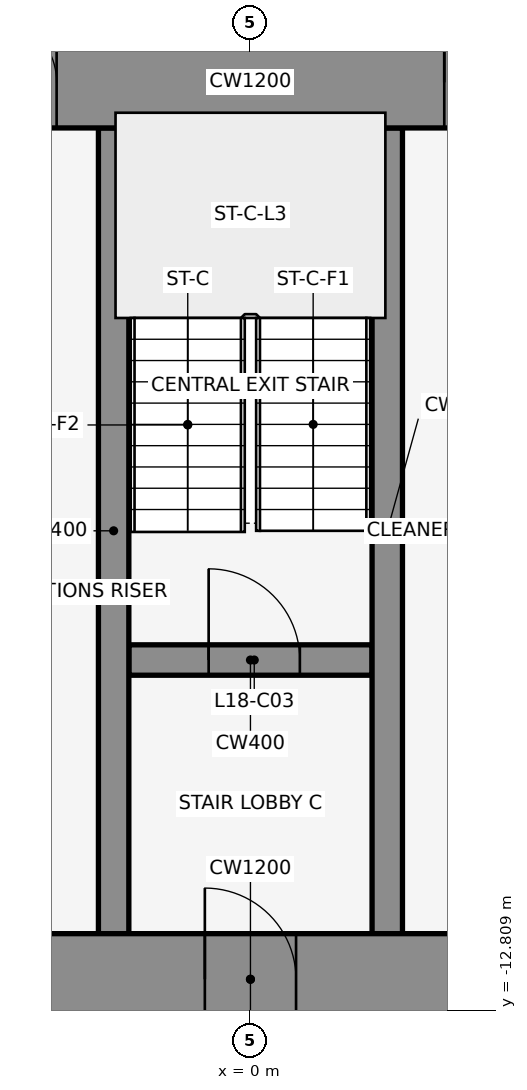
"""IFC4 building model, lengths in metres.
Left out: names, types, materials, properties, quantities, classifications, styles, units other than length and angle.
Written with IfcOpenShell. Run it as: python <this file> out.ifc"""

import sys

from ifc_helpers import new_model, si_unit, direction, frame, frame_2d, origin, place, context, subcontext, project, spatial, rectangle, extrude, element, fill, save


model = new_model("IFC4")
c1 = context("Model", 3, precision=1e-05, world=origin(), true_north=direction((0.0, 1.0)))
c2 = subcontext(c1, "Body", "Model", "MODEL_VIEW")
j1 = project(units=[si_unit("LENGTHUNIT", "METRE"), si_unit("PLANEANGLEUNIT", "RADIAN")], contexts=[c1])
p1 = place(None, origin())
s1 = spatial("IfcSite", under=j1, at=p1, CompositionType="ELEMENT")
p2 = place(p1, origin())
s2 = spatial("IfcBuilding", under=s1, at=p2, CompositionType="ELEMENT")
p3 = place(p2, frame((0.0, 0.0, 89.9)))
s3 = spatial("IfcBuildingStorey", under=s2, at=p3, CompositionType="ELEMENT", Elevation=89.9)
for number, where, z_axis, x_axis in (
    (1, (1.901, 1.08, 0.0), (0.0, 0.0, 1.0), (-0.84, -0.543, 0.0)),
    (2, (-0.068, -0.105, 0.0), (0.0, 0.0, 1.0), (-0.84, 0.543, 0.0)),
):
    element("IfcWall", number, at=place(p3, frame(where, z_axis=z_axis, x_axis=x_axis)), inside=s3, PredefinedType="STANDARD", context=c2, shape_type="SweptSolid", body=[
        extrude(rectangle(XDim=2.183, YDim=0.25, at=frame_2d((1.091, 0.0))), origin(), (0.0, 0.0, 1.0), 3.95),
    ])
p4 = place(p3, frame((-1.6, -8.2, 0.0), z_axis=(0.0, 0.0, 1.0), x_axis=(1.0, 0.0, 0.0)))
e3 = element("IfcWall", 3, at=p4, inside=s3, PredefinedType="SHEAR", context=c2, shape_type="SweptSolid", body=[
    extrude(rectangle(XDim=3.2, YDim=0.4, at=frame_2d((1.6, 0.0))), origin(), (0.0, 0.0, 1.0), 4.1),
])
p5 = place(p4, frame((1.05, 0.0, 0.0)))
e4 = element("IfcOpeningElement", 4, at=p5, cuts=e3, PredefinedType="OPENING", context=c2, shape_type="SweptSolid", body=[
    extrude(rectangle(XDim=1.2, YDim=2.1, at=frame_2d((0.6, 1.05))), frame((0.0, 0.212, 0.0), z_axis=(0.0, -1.0, 0.0), x_axis=(1.0, 0.0, 0.0)), (0.0, 0.0, 1.0), 0.424),
])
for number, where, z_axis, x_axis in (
    (5, (-1.8, -11.8, 0.0), (0.0, 0.0, 1.0), (0.0, 1.0, 0.0)),
    (6, (1.8, -11.8, 0.0), (0.0, 0.0, 1.0), (0.0, 1.0, 0.0)),
):
    element("IfcWall", number, at=place(p3, frame(where, z_axis=z_axis, x_axis=x_axis)), inside=s3, PredefinedType="SHEAR", context=c2, shape_type="SweptSolid", body=[
        extrude(rectangle(XDim=10.6, YDim=0.4, at=frame_2d((5.3, 0.0))), origin(), (0.0, 0.0, 1.0), 4.1),
    ])
p6 = place(p3, frame((-22.0, -0.6, 0.0), z_axis=(0.0, 0.0, 1.0), x_axis=(1.0, 0.0, 0.0)))
e7 = element("IfcWall", 7, at=p6, inside=s3, PredefinedType="SHEAR", context=c2, shape_type="SweptSolid", body=[
    extrude(rectangle(XDim=44.0, YDim=1.2, at=frame_2d((22.0, 0.0))), origin(), (0.0, 0.0, 1.0), 4.1),
])
p7 = place(p6, frame((18.55, 0.0, 0.0)))
e8 = element("IfcOpeningElement", 8, at=p7, cuts=e7, PredefinedType="OPENING", context=c2, shape_type="SweptSolid", body=[
    extrude(rectangle(XDim=0.9, YDim=2.1, at=frame_2d((0.45, 1.05))), frame((0.0, 0.612, 0.0), z_axis=(0.0, -1.0, 0.0), x_axis=(1.0, 0.0, 0.0)), (0.0, 0.0, 1.0), 1.224),
])
p8 = place(p6, frame((24.55, 0.0, 0.0)))
e9 = element("IfcOpeningElement", 9, at=p8, cuts=e7, PredefinedType="OPENING", context=c2, shape_type="SweptSolid", body=[
    extrude(rectangle(XDim=0.9, YDim=2.1, at=frame_2d((0.45, 1.05))), frame((0.0, 0.612, 0.0), z_axis=(0.0, -1.0, 0.0), x_axis=(1.0, 0.0, 0.0)), (0.0, 0.0, 1.0), 1.224),
])
p9 = place(p3, frame((-22.0, -12.4, 0.0), z_axis=(0.0, 0.0, 1.0), x_axis=(1.0, 0.0, 0.0)))
e10 = element("IfcWall", 10, at=p9, inside=s3, PredefinedType="SHEAR", context=c2, shape_type="SweptSolid", body=[
    extrude(rectangle(XDim=44.0, YDim=1.2, at=frame_2d((22.0, 0.0))), origin(), (0.0, 0.0, 1.0), 4.1),
])
p10 = place(p9, frame((2.2, 0.0, 0.0)))
e11 = element("IfcOpeningElement", 11, at=p10, cuts=e10, PredefinedType="OPENING", context=c2, shape_type="SweptSolid", body=[
    extrude(rectangle(XDim=1.2, YDim=2.1, at=frame_2d((0.6, 1.05))), frame((0.0, 0.612, 0.0), z_axis=(0.0, -1.0, 0.0), x_axis=(1.0, 0.0, 0.0)), (0.0, 0.0, 1.0), 1.224),
])
p11 = place(p9, frame((21.4, 0.0, 0.0)))
e12 = element("IfcOpeningElement", 12, at=p11, cuts=e10, PredefinedType="OPENING", context=c2, shape_type="SweptSolid", body=[
    extrude(rectangle(XDim=1.2, YDim=2.1, at=frame_2d((0.6, 1.05))), frame((0.0, 0.612, 0.0), z_axis=(0.0, -1.0, 0.0), x_axis=(1.0, 0.0, 0.0)), (0.0, 0.0, 1.0), 1.224),
])
p12 = place(p9, frame((40.6, 0.0, 0.0)))
e13 = element("IfcOpeningElement", 13, at=p12, cuts=e10, PredefinedType="OPENING", context=c2, shape_type="SweptSolid", body=[
    extrude(rectangle(XDim=1.2, YDim=2.1, at=frame_2d((0.6, 1.05))), frame((0.0, 0.612, 0.0), z_axis=(0.0, -1.0, 0.0), x_axis=(1.0, 0.0, 0.0)), (0.0, 0.0, 1.0), 1.224),
])
p13 = place(p9, frame((16.0, 0.0, 0.0)))
e14 = element("IfcOpeningElement", 14, at=p13, cuts=e10, PredefinedType="OPENING", context=c2, shape_type="SweptSolid", body=[
    extrude(rectangle(XDim=1.8, YDim=2.1, at=frame_2d((0.9, 1.05))), frame((0.0, 0.612, 0.0), z_axis=(0.0, -1.0, 0.0), x_axis=(1.0, 0.0, 0.0)), (0.0, 0.0, 1.0), 1.224),
])
p14 = place(p9, frame((6.3, 0.0, 0.0)))
e15 = element("IfcOpeningElement", 15, at=p14, cuts=e10, PredefinedType="OPENING", context=c2, shape_type="SweptSolid", body=[
    extrude(rectangle(XDim=1.2, YDim=2.1, at=frame_2d((0.6, 1.05))), frame((0.0, 0.612, 0.0), z_axis=(0.0, -1.0, 0.0), x_axis=(1.0, 0.0, 0.0)), (0.0, 0.0, 1.0), 1.224),
])
p15 = place(p9, frame((26.2, 0.0, 0.0)))
e16 = element("IfcOpeningElement", 16, at=p15, cuts=e10, PredefinedType="OPENING", context=c2, shape_type="SweptSolid", body=[
    extrude(rectangle(XDim=1.8, YDim=2.1, at=frame_2d((0.9, 1.05))), frame((0.0, 0.612, 0.0), z_axis=(0.0, -1.0, 0.0), x_axis=(1.0, 0.0, 0.0)), (0.0, 0.0, 1.0), 1.224),
])
p16 = place(p9, frame((36.5, 0.0, 0.0)))
e17 = element("IfcOpeningElement", 17, at=p16, cuts=e10, PredefinedType="OPENING", context=c2, shape_type="SweptSolid", body=[
    extrude(rectangle(XDim=1.2, YDim=2.1, at=frame_2d((0.6, 1.05))), frame((0.0, 0.612, 0.0), z_axis=(0.0, -1.0, 0.0), x_axis=(1.0, 0.0, 0.0)), (0.0, 0.0, 1.0), 1.224),
])
p17 = place(p5, origin())
e18 = element("IfcDoor", 18, at=p17, inside=s3, OperationType="SINGLE_SWING_LEFT", PredefinedType="DOOR", context=c2, shape_type="SweptSolid", body=[
    extrude(rectangle(XDim=1.2, YDim=2.1, at=frame_2d((0.6, 1.05))), frame((0.0, 0.025, 0.0), z_axis=(0.0, -1.0, 0.0), x_axis=(1.0, 0.0, 0.0)), (0.0, 0.0, 1.0), 0.05),
])
fill(e4, e18)
p18 = place(p7, origin())
e19 = element("IfcDoor", 19, at=p18, inside=s3, OperationType="SINGLE_SWING_LEFT", PredefinedType="DOOR", context=c2, shape_type="SweptSolid", body=[
    extrude(rectangle(XDim=0.9, YDim=2.1, at=frame_2d((0.45, 1.05))), frame((0.0, 0.025, 0.0), z_axis=(0.0, -1.0, 0.0), x_axis=(1.0, 0.0, 0.0)), (0.0, 0.0, 1.0), 0.05),
])
fill(e8, e19)
p19 = place(p8, origin())
e20 = element("IfcDoor", 20, at=p19, inside=s3, OperationType="SINGLE_SWING_LEFT", PredefinedType="DOOR", context=c2, shape_type="SweptSolid", body=[
    extrude(rectangle(XDim=0.9, YDim=2.1, at=frame_2d((0.45, 1.05))), frame((0.0, 0.025, 0.0), z_axis=(0.0, -1.0, 0.0), x_axis=(1.0, 0.0, 0.0)), (0.0, 0.0, 1.0), 0.05),
])
fill(e9, e20)
p20 = place(p11, frame((1.2, 0.0, 0.0), z_axis=(0.0, 0.0, 1.0), x_axis=(-1.0, 0.0, 0.0)))
e21 = element("IfcDoor", 21, at=p20, inside=s3, OperationType="SINGLE_SWING_RIGHT", PredefinedType="DOOR", context=c2, shape_type="SweptSolid", body=[
    extrude(rectangle(XDim=1.2, YDim=2.1, at=frame_2d((0.6, 1.05))), frame((0.0, 0.025, 0.0), z_axis=(0.0, -1.0, 0.0), x_axis=(1.0, 0.0, 0.0)), (0.0, 0.0, 1.0), 0.05),
])
fill(e12, e21)
save(model, sys.argv[1])
